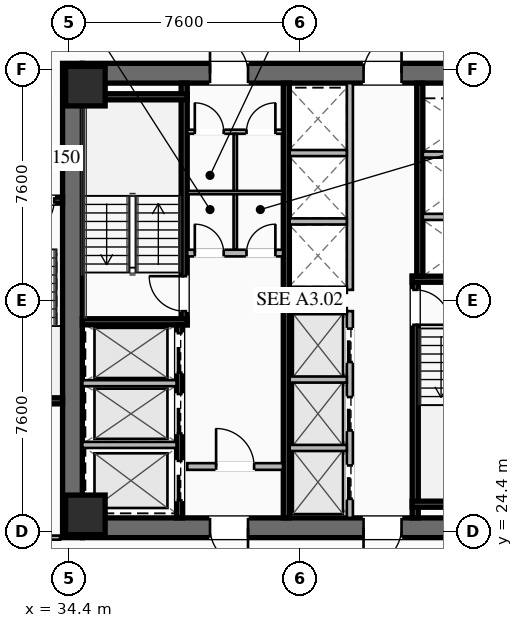
"""IFC4 building model, lengths in metres.
Left out: names, types, materials, properties, quantities, classifications, styles, units other than length and angle.
Written with IfcOpenShell. Run it as: python <this file> out.ifc"""

import sys

from ifc_helpers import new_model, si_unit, direction, frame, frame_2d, origin, origin_2d, place, context, subcontext, project, spatial, rectangle, hollow_rectangle, extrude, element, fill, save


model = new_model("IFC4")
c1 = context("Model", 3, precision=1e-05, world=origin(), true_north=direction((0.0, 1.0)))
c2 = subcontext(c1, "Body", "Model", "MODEL_VIEW")
j1 = project(units=[si_unit("LENGTHUNIT", "METRE"), si_unit("PLANEANGLEUNIT", "RADIAN")], contexts=[c1])
p1 = place(None, origin())
s1 = spatial("IfcSite", under=j1, at=p1, CompositionType="ELEMENT")
p2 = place(p1, origin())
s2 = spatial("IfcBuilding", under=s1, at=p2, CompositionType="ELEMENT")
p3 = place(p2, frame((0.0, 0.0, 102.7)))
s3 = spatial("IfcBuildingStorey", under=s2, at=p3, CompositionType="ELEMENT", Elevation=102.7)
p4 = place(p3, frame((34.525, 24.2, 0.0), z_axis=(0.0, 0.0, 1.0), x_axis=(0.0, 1.0, 0.0)))
e1 = element("IfcWall", 1, at=p4, inside=s3, PredefinedType="SHEAR", context=c2, shape_type="SweptSolid", body=[
    extrude(rectangle(XDim=15.6, YDim=0.65, at=frame_2d((7.8, 0.0))), origin(), (0.0, 0.0, 1.0), 3.55),
])
p5 = place(p3, frame((49.15, 24.525, 0.0), z_axis=(0.0, 0.0, 1.0), x_axis=(-1.0, 0.0, 0.0)))
e2 = element("IfcWall", 2, at=p5, inside=s3, PredefinedType="SHEAR", context=c2, shape_type="SweptSolid", body=[
    extrude(rectangle(XDim=14.3, YDim=0.65, at=frame_2d((7.15, 0.0))), origin(), (0.0, 0.0, 1.0), 3.55),
])
p6 = place(p5, frame((8.85, 0.0, 0.0)))
e3 = element("IfcOpeningElement", 3, at=p6, cuts=e2, PredefinedType="OPENING", context=c2, shape_type="SweptSolid", body=[
    extrude(rectangle(XDim=1.25, YDim=2.25, at=frame_2d((0.625, 1.125))), frame((0.0, 0.335, 0.0), z_axis=(0.0, -1.0, 0.0), x_axis=(1.0, 0.0, 0.0)), (0.0, 0.0, 1.0), 0.67),
])
p7 = place(p5, frame((3.8, 0.0, 0.0)))
e4 = element("IfcOpeningElement", 4, at=p7, cuts=e2, PredefinedType="OPENING", context=c2, shape_type="SweptSolid", body=[
    extrude(rectangle(XDim=1.25, YDim=2.25, at=frame_2d((0.625, 1.125))), frame((0.0, 0.335, 0.0), z_axis=(0.0, -1.0, 0.0), x_axis=(1.0, 0.0, 0.0)), (0.0, 0.0, 1.0), 0.67),
])
p8 = place(p3, frame((34.85, 39.475, 0.0), z_axis=(0.0, 0.0, 1.0), x_axis=(1.0, 0.0, 0.0)))
e5 = element("IfcWall", 5, at=p8, inside=s3, PredefinedType="SHEAR", context=c2, shape_type="SweptSolid", body=[
    extrude(rectangle(XDim=14.3, YDim=0.65, at=frame_2d((7.15, 0.0))), origin(), (0.0, 0.0, 1.0), 3.55),
])
p9 = place(p8, frame((4.2, 0.0, 0.0)))
e6 = element("IfcOpeningElement", 6, at=p9, cuts=e5, PredefinedType="OPENING", context=c2, shape_type="SweptSolid", body=[
    extrude(rectangle(XDim=1.25, YDim=2.25, at=frame_2d((0.625, 1.125))), frame((0.0, 0.335, 0.0), z_axis=(0.0, -1.0, 0.0), x_axis=(1.0, 0.0, 0.0)), (0.0, 0.0, 1.0), 0.67),
])
p10 = place(p8, frame((9.25, 0.0, 0.0)))
e7 = element("IfcOpeningElement", 7, at=p10, cuts=e5, PredefinedType="OPENING", context=c2, shape_type="SweptSolid", body=[
    extrude(rectangle(XDim=1.25, YDim=2.25, at=frame_2d((0.625, 1.125))), frame((0.0, 0.335, 0.0), z_axis=(0.0, -1.0, 0.0), x_axis=(1.0, 0.0, 0.0)), (0.0, 0.0, 1.0), 0.67),
])
for number, where, z_axis, x_axis in (
    (8, (34.95, 24.95, 0.0), (0.0, 0.0, 1.0), (1.0, 0.0, 0.0)),
    (9, (34.95, 39.05, 0.0), (0.0, 0.0, 1.0), (1.0, 0.0, 0.0)),
):
    element("IfcColumn", number, at=place(p3, frame(where, z_axis=z_axis, x_axis=x_axis)), inside=s3, PredefinedType="COLUMN", context=c2, shape_type="SweptSolid", body=[
        extrude(hollow_rectangle(XDim=1.3, YDim=1.3, WallThickness=0.05, at=origin_2d()), origin(), (0.0, 0.0, 1.0), 3.35),
    ])
p11 = place(p3, frame((38.2, 31.2, 0.0), z_axis=(0.0, 0.0, 1.0), x_axis=(0.0, 1.0, 0.0)))
e10 = element("IfcWall", 10, at=p11, inside=s3, PredefinedType="SHEAR", context=c2, shape_type="SweptSolid", body=[
    extrude(rectangle(XDim=7.95, YDim=0.2, at=frame_2d((3.975, 0.0))), origin(), (0.0, 0.0, 1.0), 3.35),
])
p12 = place(p11, frame((0.45, 0.0, 0.0)))
e11 = element("IfcOpeningElement", 11, at=p12, cuts=e10, PredefinedType="OPENING", context=c2, shape_type="SweptSolid", body=[
    extrude(rectangle(XDim=1.15, YDim=2.2, at=frame_2d((0.575, 1.1))), frame((0.0, 0.11, 0.0), z_axis=(0.0, -1.0, 0.0), x_axis=(1.0, 0.0, 0.0)), (0.0, 0.0, 1.0), 0.22),
])
for number, where, z_axis, x_axis in (
    (12, (34.85, 31.3, 0.0), (0.0, 0.0, 1.0), (1.0, 0.0, 0.0)),
    (13, (34.85, 38.7, 0.0), (0.0, 0.0, 1.0), (1.0, 0.0, 0.0)),
):
    element("IfcWall", number, at=place(p3, frame(where, z_axis=z_axis, x_axis=x_axis)), inside=s3, PredefinedType="SHEAR", context=c2, shape_type="SweptSolid", body=[
        extrude(rectangle(XDim=3.45, YDim=0.2, at=frame_2d((1.725, 0.0))), origin(), (0.0, 0.0, 1.0), 3.35),
    ])
p13 = place(p3, frame((45.8, 32.8, 0.0), z_axis=(0.0, 0.0, 1.0), x_axis=(0.0, -1.0, 0.0)))
e14 = element("IfcWall", 14, at=p13, inside=s3, PredefinedType="SHEAR", context=c2, shape_type="SweptSolid", body=[
    extrude(rectangle(XDim=7.95, YDim=0.2, at=frame_2d((3.975, 0.0))), origin(), (0.0, 0.0, 1.0), 3.35),
])
p14 = place(p13, frame((0.45, 0.0, 0.0)))
e15 = element("IfcOpeningElement", 15, at=p14, cuts=e14, PredefinedType="OPENING", context=c2, shape_type="SweptSolid", body=[
    extrude(rectangle(XDim=1.15, YDim=2.2, at=frame_2d((0.575, 1.1))), frame((0.0, 0.11, 0.0), z_axis=(0.0, -1.0, 0.0), x_axis=(1.0, 0.0, 0.0)), (0.0, 0.0, 1.0), 0.22),
])
for number, where, z_axis, x_axis in (
    (16, (45.7, 32.7, 0.0), (0.0, 0.0, 1.0), (1.0, 0.0, 0.0)),
    (17, (45.7, 25.3, 0.0), (0.0, 0.0, 1.0), (1.0, 0.0, 0.0)),
):
    element("IfcWall", number, at=place(p3, frame(where, z_axis=z_axis, x_axis=x_axis)), inside=s3, PredefinedType="SHEAR", context=c2, shape_type="SweptSolid", body=[
        extrude(rectangle(XDim=3.45, YDim=0.2, at=frame_2d((1.725, 0.0))), origin(), (0.0, 0.0, 1.0), 3.35),
    ])
p15 = place(p3, frame((41.56, 24.85, 0.0), z_axis=(0.0, 0.0, 1.0), x_axis=(0.0, 1.0, 0.0)))
e18 = element("IfcWall", 18, at=p15, inside=s3, PredefinedType="SHEAR", context=c2, shape_type="SweptSolid", body=[
    extrude(rectangle(XDim=14.3, YDim=0.2, at=frame_2d((7.15, 0.0))), origin(), (0.0, 0.0, 1.0), 3.35),
])
p16 = place(p3, frame((38.3, 33.56, 0.0), z_axis=(0.0, 0.0, 1.0), x_axis=(1.0, 0.0, 0.0)))
e19 = element("IfcWall", 19, at=p16, inside=s3, PredefinedType="SOLIDWALL", context=c2, shape_type="SweptSolid", body=[
    extrude(rectangle(XDim=3.15, YDim=0.22, at=frame_2d((1.575, 0.0))), origin(), (0.0, 0.0, 1.0), 2.703),
])
p17 = place(p16, frame((0.25, 0.0, 0.0)))
e20 = element("IfcOpeningElement", 20, at=p17, cuts=e19, PredefinedType="OPENING", context=c2, shape_type="SweptSolid", body=[
    extrude(rectangle(XDim=0.95, YDim=2.05, at=frame_2d((0.475, 1.025))), frame((0.0, 0.12, 0.0), z_axis=(0.0, -1.0, 0.0), x_axis=(1.0, 0.0, 0.0)), (0.0, 0.0, 1.0), 0.24),
])
p18 = place(p16, frame((1.95, 0.0, 0.0)))
e21 = element("IfcOpeningElement", 21, at=p18, cuts=e19, PredefinedType="OPENING", context=c2, shape_type="SweptSolid", body=[
    extrude(rectangle(XDim=0.95, YDim=2.05, at=frame_2d((0.475, 1.025))), frame((0.0, 0.12, 0.0), z_axis=(0.0, -1.0, 0.0), x_axis=(1.0, 0.0, 0.0)), (0.0, 0.0, 1.0), 0.24),
])
p19 = place(p3, frame((38.3, 26.54, 0.0), z_axis=(0.0, 0.0, 1.0), x_axis=(1.0, 0.0, 0.0)))
e22 = element("IfcWall", 22, at=p19, inside=s3, PredefinedType="SOLIDWALL", context=c2, shape_type="SweptSolid", body=[
    extrude(rectangle(XDim=3.15, YDim=0.22, at=frame_2d((1.575, 0.0))), origin(), (0.0, 0.0, 1.0), 2.703),
])
p20 = place(p19, frame((0.95, 0.0, 0.0)))
e23 = element("IfcOpeningElement", 23, at=p20, cuts=e22, PredefinedType="OPENING", context=c2, shape_type="SweptSolid", body=[
    extrude(rectangle(XDim=1.25, YDim=2.25, at=frame_2d((0.625, 1.125))), frame((0.0, 0.12, 0.0), z_axis=(0.0, -1.0, 0.0), x_axis=(1.0, 0.0, 0.0)), (0.0, 0.0, 1.0), 0.24),
])
p21 = place(p3, frame((38.05, 24.85, 0.0), z_axis=(0.0, 0.0, 1.0), x_axis=(0.0, 1.0, 0.0)))
e24 = element("IfcWall", 24, at=p21, inside=s3, PredefinedType="SHEAR", context=c2, shape_type="SweptSolid", body=[
    extrude(rectangle(XDim=6.35, YDim=0.2, at=frame_2d((3.175, 0.0))), origin(), (0.0, 0.0, 1.0), 3.35),
])
p22 = place(p21, frame((4.775, 0.0, 0.0)))
e25 = element("IfcOpeningElement", 25, at=p22, cuts=e24, PredefinedType="OPENING", context=c2, shape_type="SweptSolid", body=[
    extrude(rectangle(XDim=1.3, YDim=2.25, at=frame_2d((0.65, 1.125))), frame((0.0, 0.11, 0.0), z_axis=(0.0, -1.0, 0.0), x_axis=(1.0, 0.0, 0.0)), (0.0, 0.0, 1.0), 0.22),
])
p23 = place(p21, frame((2.775, 0.0, 0.0)))
e26 = element("IfcOpeningElement", 26, at=p23, cuts=e24, PredefinedType="OPENING", context=c2, shape_type="SweptSolid", body=[
    extrude(rectangle(XDim=1.3, YDim=2.25, at=frame_2d((0.65, 1.125))), frame((0.0, 0.11, 0.0), z_axis=(0.0, -1.0, 0.0), x_axis=(1.0, 0.0, 0.0)), (0.0, 0.0, 1.0), 0.22),
])
p24 = place(p21, frame((0.575, 0.0, 0.0)))
e27 = element("IfcOpeningElement", 27, at=p24, cuts=e24, PredefinedType="OPENING", context=c2, shape_type="SweptSolid", body=[
    extrude(rectangle(XDim=1.3, YDim=2.25, at=frame_2d((0.65, 1.125))), frame((0.0, 0.11, 0.0), z_axis=(0.0, -1.0, 0.0), x_axis=(1.0, 0.0, 0.0)), (0.0, 0.0, 1.0), 0.22),
])
for number, where, z_axis, x_axis in (
    (28, (34.85, 27.25, 0.0), (0.0, 0.0, 1.0), (1.0, 0.0, 0.0)),
    (29, (34.85, 29.28, 0.0), (0.0, 0.0, 1.0), (1.0, 0.0, 0.0)),
):
    element("IfcWall", number, at=place(p3, frame(where, z_axis=z_axis, x_axis=x_axis)), inside=s3, PredefinedType="SOLIDWALL", context=c2, shape_type="SweptSolid", body=[
        extrude(rectangle(XDim=3.1, YDim=0.2, at=frame_2d((1.55, 0.0))), origin(), (0.0, 0.0, 1.0), 3.35),
    ])
p25 = place(p3, frame((45.95, 39.15, 0.0), z_axis=(0.0, 0.0, 1.0), x_axis=(0.0, -1.0, 0.0)))
e30 = element("IfcWall", 30, at=p25, inside=s3, PredefinedType="SHEAR", context=c2, shape_type="SweptSolid", body=[
    extrude(rectangle(XDim=6.35, YDim=0.2, at=frame_2d((3.175, 0.0))), origin(), (0.0, 0.0, 1.0), 3.35),
])
for number, where, z_axis, x_axis in (
    (31, (46.05, 34.75, 0.0), (0.0, 0.0, 1.0), (1.0, 0.0, 0.0)),
    (32, (46.05, 36.8, 0.0), (0.0, 0.0, 1.0), (1.0, 0.0, 0.0)),
):
    element("IfcWall", number, at=place(p3, frame(where, z_axis=z_axis, x_axis=x_axis)), inside=s3, PredefinedType="SOLIDWALL", context=c2, shape_type="SweptSolid", body=[
        extrude(rectangle(XDim=3.1, YDim=0.2, at=frame_2d((1.55, 0.0))), origin(), (0.0, 0.0, 1.0), 3.35),
    ])
p26 = place(p3, frame((38.3, 37.55, 0.0), z_axis=(0.0, 0.0, 1.0), x_axis=(1.0, 0.0, 0.0)))
e33 = element("IfcWall", 33, at=p26, inside=s3, PredefinedType="PARTITIONING", context=c2, shape_type="SweptSolid", body=[
    extrude(rectangle(XDim=3.15, YDim=0.135, at=frame_2d((1.575, 0.0))), origin(), (0.0, 0.0, 1.0), 2.703),
])
p27 = place(p26, frame((0.25, 0.0, 0.0)))
e34 = element("IfcOpeningElement", 34, at=p27, cuts=e33, PredefinedType="OPENING", context=c2, shape_type="SweptSolid", body=[
    extrude(rectangle(XDim=0.95, YDim=2.05, at=frame_2d((0.475, 1.025))), frame((0.0, 0.077, 0.0), z_axis=(0.0, -1.0, 0.0), x_axis=(1.0, 0.0, 0.0)), (0.0, 0.0, 1.0), 0.155),
])
p28 = place(p26, frame((1.95, 0.0, 0.0)))
e35 = element("IfcOpeningElement", 35, at=p28, cuts=e33, PredefinedType="OPENING", context=c2, shape_type="SweptSolid", body=[
    extrude(rectangle(XDim=0.95, YDim=2.05, at=frame_2d((0.475, 1.025))), frame((0.0, 0.077, 0.0), z_axis=(0.0, -1.0, 0.0), x_axis=(1.0, 0.0, 0.0)), (0.0, 0.0, 1.0), 0.155),
])
p29 = place(p3, frame((39.88, 33.68, 0.0), z_axis=(0.0, 0.0, 1.0), x_axis=(0.0, 1.0, 0.0)))
e36 = element("IfcWall", 36, at=p29, inside=s3, PredefinedType="PARTITIONING", context=c2, shape_type="SweptSolid", body=[
    extrude(rectangle(XDim=3.8, YDim=0.11, at=frame_2d((1.9, 0.0))), origin(), (0.0, 0.0, 1.0), 2.703),
])
p30 = place(p3, frame((38.3, 35.55, 0.0), z_axis=(0.0, 0.0, 1.0), x_axis=(1.0, 0.0, 0.0)))
e37 = element("IfcWall", 37, at=p30, inside=s3, PredefinedType="PARTITIONING", context=c2, shape_type="SweptSolid", body=[
    extrude(rectangle(XDim=3.15, YDim=0.11, at=frame_2d((1.575, 0.0))), origin(), (0.0, 0.0, 1.0), 2.703),
])
p31 = place(p3, frame((43.65, 24.85, 0.0), z_axis=(0.0, 0.0, 1.0), x_axis=(0.0, 1.0, 0.0)))
e38 = element("IfcWall", 38, at=p31, inside=s3, PredefinedType="SOLIDWALL", context=c2, shape_type="SweptSolid", body=[
    extrude(rectangle(XDim=6.8, YDim=0.2, at=frame_2d((3.4, 0.0))), origin(), (0.0, 0.0, 1.0), 3.35),
])
p32 = place(p31, frame((0.625, 0.0, 0.0)))
e39 = element("IfcOpeningElement", 39, at=p32, cuts=e38, PredefinedType="OPENING", context=c2, shape_type="SweptSolid", body=[
    extrude(rectangle(XDim=1.1, YDim=2.2, at=frame_2d((0.55, 1.1))), frame((0.0, 0.11, 0.0), z_axis=(0.0, -1.0, 0.0), x_axis=(1.0, 0.0, 0.0)), (0.0, 0.0, 1.0), 0.22),
])
p33 = place(p31, frame((2.875, 0.0, 0.0)))
e40 = element("IfcOpeningElement", 40, at=p33, cuts=e38, PredefinedType="OPENING", context=c2, shape_type="SweptSolid", body=[
    extrude(rectangle(XDim=1.1, YDim=2.2, at=frame_2d((0.55, 1.1))), frame((0.0, 0.11, 0.0), z_axis=(0.0, -1.0, 0.0), x_axis=(1.0, 0.0, 0.0)), (0.0, 0.0, 1.0), 0.22),
])
p34 = place(p31, frame((5.125, 0.0, 0.0)))
e41 = element("IfcOpeningElement", 41, at=p34, cuts=e38, PredefinedType="OPENING", context=c2, shape_type="SweptSolid", body=[
    extrude(rectangle(XDim=1.1, YDim=2.2, at=frame_2d((0.55, 1.1))), frame((0.0, 0.11, 0.0), z_axis=(0.0, -1.0, 0.0), x_axis=(1.0, 0.0, 0.0)), (0.0, 0.0, 1.0), 0.22),
])
for number, where, z_axis, x_axis in (
    (42, (41.67, 27.15, 0.0), (0.0, 0.0, 1.0), (1.0, 0.0, 0.0)),
    (43, (41.67, 29.4, 0.0), (0.0, 0.0, 1.0), (1.0, 0.0, 0.0)),
    (44, (41.67, 31.65, 0.0), (0.0, 0.0, 1.0), (1.0, 0.0, 0.0)),
):
    element("IfcWall", number, at=place(p3, frame(where, z_axis=z_axis, x_axis=x_axis)), inside=s3, PredefinedType="SOLIDWALL", context=c2, shape_type="SweptSolid", body=[
        extrude(rectangle(XDim=1.88, YDim=0.2, at=frame_2d((0.94, 0.0))), origin(), (0.0, 0.0, 1.0), 3.35),
    ])
p35 = place(p3, frame((43.65, 32.35, 0.0), z_axis=(0.0, 0.0, 1.0), x_axis=(0.0, 1.0, 0.0)))
e45 = element("IfcWall", 45, at=p35, inside=s3, PredefinedType="SOLIDWALL", context=c2, shape_type="SweptSolid", body=[
    extrude(rectangle(XDim=6.8, YDim=0.2, at=frame_2d((3.4, 0.0))), origin(), (0.0, 0.0, 1.0), 3.35),
])
for number, where, z_axis, x_axis in (
    (46, (41.67, 32.35, 0.0), (0.0, 0.0, 1.0), (1.0, 0.0, 0.0)),
    (47, (41.67, 34.6, 0.0), (0.0, 0.0, 1.0), (1.0, 0.0, 0.0)),
    (48, (41.67, 36.85, 0.0), (0.0, 0.0, 1.0), (1.0, 0.0, 0.0)),
):
    element("IfcWall", number, at=place(p3, frame(where, z_axis=z_axis, x_axis=x_axis)), inside=s3, PredefinedType="SOLIDWALL", context=c2, shape_type="SweptSolid", body=[
        extrude(rectangle(XDim=1.88, YDim=0.2, at=frame_2d((0.94, 0.0))), origin(), (0.0, 0.0, 1.0), 3.35),
    ])
p36 = place(p3, frame((34.2, 35.3, 0.0), z_axis=(0.0, 0.0, 1.0), x_axis=(-1.0, 0.0, 0.0)))
e49 = element("IfcWall", 49, at=p36, inside=s3, PredefinedType="SHEAR", context=c2, shape_type="SweptSolid", body=[
    extrude(rectangle(XDim=3.4, YDim=0.2, at=frame_2d((1.7, 0.0))), origin(), (0.0, 0.0, 1.0), 3.35),
])
p37 = place(p36, frame((0.275, 0.0, 0.0)))
e50 = element("IfcOpeningElement", 50, at=p37, cuts=e49, PredefinedType="OPENING", context=c2, shape_type="SweptSolid", body=[
    extrude(rectangle(XDim=1.15, YDim=2.2, at=frame_2d((0.575, 1.1))), frame((0.0, 0.11, 0.0), z_axis=(0.0, -1.0, 0.0), x_axis=(1.0, 0.0, 0.0)), (0.0, 0.0, 1.0), 0.22),
])
p38 = place(p3, frame((30.8, 28.7, 0.0), z_axis=(0.0, 0.0, 1.0), x_axis=(1.0, 0.0, 0.0)))
e51 = element("IfcWall", 51, at=p38, inside=s3, PredefinedType="SHEAR", context=c2, shape_type="SweptSolid", body=[
    extrude(rectangle(XDim=3.4, YDim=0.2, at=frame_2d((1.7, 0.0))), origin(), (0.0, 0.0, 1.0), 3.35),
])
p39 = place(p3, frame((21.02, 24.2, 0.0), z_axis=(0.0, 0.0, 1.0), x_axis=(1.0, 0.0, 0.0)))
e52 = element("IfcWall", 52, at=p39, inside=s3, PredefinedType="PARTITIONING", context=c2, shape_type="SweptSolid", body=[
    extrude(rectangle(XDim=13.1, YDim=0.135, at=frame_2d((6.55, 0.0))), origin(), (0.0, 0.0, 1.0), 2.703),
])
p40 = place(p39, frame((10.105, 0.0, 0.0)))
e53 = element("IfcOpeningElement", 53, at=p40, cuts=e52, PredefinedType="OPENING", context=c2, shape_type="SweptSolid", body=[
    extrude(rectangle(XDim=0.95, YDim=2.05, at=frame_2d((0.475, 1.025))), frame((0.0, 0.077, 0.0), z_axis=(0.0, -1.0, 0.0), x_axis=(1.0, 0.0, 0.0)), (0.0, 0.0, 1.0), 0.155),
])
p41 = place(p9, origin())
e54 = element("IfcDoor", 54, at=p41, inside=s3, OperationType="SINGLE_SWING_LEFT", PredefinedType="DOOR", context=c2, shape_type="SweptSolid", body=[
    extrude(rectangle(XDim=1.25, YDim=2.25, at=frame_2d((0.625, 1.125))), frame((0.0, 0.025, 0.0), z_axis=(0.0, -1.0, 0.0), x_axis=(1.0, 0.0, 0.0)), (0.0, 0.0, 1.0), 0.05),
])
fill(e6, e54)
p42 = place(p10, origin())
e55 = element("IfcDoor", 55, at=p42, inside=s3, OperationType="SINGLE_SWING_RIGHT", PredefinedType="DOOR", context=c2, shape_type="SweptSolid", body=[
    extrude(rectangle(XDim=1.25, YDim=2.25, at=frame_2d((0.625, 1.125))), frame((0.0, 0.025, 0.0), z_axis=(0.0, -1.0, 0.0), x_axis=(1.0, 0.0, 0.0)), (0.0, 0.0, 1.0), 0.05),
])
fill(e7, e55)
p43 = place(p6, origin())
e56 = element("IfcDoor", 56, at=p43, inside=s3, OperationType="SINGLE_SWING_LEFT", PredefinedType="DOOR", context=c2, shape_type="SweptSolid", body=[
    extrude(rectangle(XDim=1.25, YDim=2.25, at=frame_2d((0.625, 1.125))), frame((0.0, 0.025, 0.0), z_axis=(0.0, -1.0, 0.0), x_axis=(1.0, 0.0, 0.0)), (0.0, 0.0, 1.0), 0.05),
])
fill(e3, e56)
p44 = place(p7, origin())
e57 = element("IfcDoor", 57, at=p44, inside=s3, OperationType="SINGLE_SWING_RIGHT", PredefinedType="DOOR", context=c2, shape_type="SweptSolid", body=[
    extrude(rectangle(XDim=1.25, YDim=2.25, at=frame_2d((0.625, 1.125))), frame((0.0, 0.025, 0.0), z_axis=(0.0, -1.0, 0.0), x_axis=(1.0, 0.0, 0.0)), (0.0, 0.0, 1.0), 0.05),
])
fill(e4, e57)
p45 = place(p12, origin())
e58 = element("IfcDoor", 58, at=p45, inside=s3, OperationType="SINGLE_SWING_RIGHT", PredefinedType="DOOR", context=c2, shape_type="SweptSolid", body=[
    extrude(rectangle(XDim=1.15, YDim=2.2, at=frame_2d((0.575, 1.1))), frame((0.0, 0.025, 0.0), z_axis=(0.0, -1.0, 0.0), x_axis=(1.0, 0.0, 0.0)), (0.0, 0.0, 1.0), 0.05),
])
fill(e11, e58)
p46 = place(p14, origin())
e59 = element("IfcDoor", 59, at=p46, inside=s3, OperationType="SINGLE_SWING_RIGHT", PredefinedType="DOOR", context=c2, shape_type="SweptSolid", body=[
    extrude(rectangle(XDim=1.15, YDim=2.2, at=frame_2d((0.575, 1.1))), frame((0.0, 0.025, 0.0), z_axis=(0.0, -1.0, 0.0), x_axis=(1.0, 0.0, 0.0)), (0.0, 0.0, 1.0), 0.05),
])
fill(e15, e59)
p47 = place(p20, origin())
e60 = element("IfcDoor", 60, at=p47, inside=s3, OperationType="SINGLE_SWING_LEFT", PredefinedType="DOOR", context=c2, shape_type="SweptSolid", body=[
    extrude(rectangle(XDim=1.25, YDim=2.25, at=frame_2d((0.625, 1.125))), frame((0.0, 0.025, 0.0), z_axis=(0.0, -1.0, 0.0), x_axis=(1.0, 0.0, 0.0)), (0.0, 0.0, 1.0), 0.05),
])
fill(e23, e60)
p48 = place(p27, origin())
e61 = element("IfcDoor", 61, at=p48, inside=s3, OperationType="SINGLE_SWING_LEFT", PredefinedType="DOOR", context=c2, shape_type="SweptSolid", body=[
    extrude(rectangle(XDim=0.95, YDim=2.05, at=frame_2d((0.475, 1.025))), frame((0.0, 0.025, 0.0), z_axis=(0.0, -1.0, 0.0), x_axis=(1.0, 0.0, 0.0)), (0.0, 0.0, 1.0), 0.05),
])
fill(e34, e61)
p49 = place(p28, origin())
e62 = element("IfcDoor", 62, at=p49, inside=s3, OperationType="SINGLE_SWING_RIGHT", PredefinedType="DOOR", context=c2, shape_type="SweptSolid", body=[
    extrude(rectangle(XDim=0.95, YDim=2.05, at=frame_2d((0.475, 1.025))), frame((0.0, 0.025, 0.0), z_axis=(0.0, -1.0, 0.0), x_axis=(1.0, 0.0, 0.0)), (0.0, 0.0, 1.0), 0.05),
])
fill(e35, e62)
p50 = place(p17, origin())
e63 = element("IfcDoor", 63, at=p50, inside=s3, OperationType="SINGLE_SWING_LEFT", PredefinedType="DOOR", context=c2, shape_type="SweptSolid", body=[
    extrude(rectangle(XDim=0.95, YDim=2.05, at=frame_2d((0.475, 1.025))), frame((0.0, 0.025, 0.0), z_axis=(0.0, -1.0, 0.0), x_axis=(1.0, 0.0, 0.0)), (0.0, 0.0, 1.0), 0.05),
])
fill(e20, e63)
p51 = place(p18, origin())
e64 = element("IfcDoor", 64, at=p51, inside=s3, OperationType="SINGLE_SWING_RIGHT", PredefinedType="DOOR", context=c2, shape_type="SweptSolid", body=[
    extrude(rectangle(XDim=0.95, YDim=2.05, at=frame_2d((0.475, 1.025))), frame((0.0, 0.025, 0.0), z_axis=(0.0, -1.0, 0.0), x_axis=(1.0, 0.0, 0.0)), (0.0, 0.0, 1.0), 0.05),
])
fill(e21, e64)
p52 = place(p37, origin())
e65 = element("IfcDoor", 65, at=p52, inside=s3, OperationType="SINGLE_SWING_RIGHT", PredefinedType="DOOR", context=c2, shape_type="SweptSolid", body=[
    extrude(rectangle(XDim=1.15, YDim=2.2, at=frame_2d((0.575, 1.1))), frame((0.0, 0.025, 0.0), z_axis=(0.0, -1.0, 0.0), x_axis=(1.0, 0.0, 0.0)), (0.0, 0.0, 1.0), 0.05),
])
fill(e50, e65)
p53 = place(p22, origin())
e66 = element("IfcDoor", 66, at=p53, inside=s3, OperationType="SLIDING_TO_LEFT", PredefinedType="DOOR", context=c2, shape_type="SweptSolid", body=[
    extrude(rectangle(XDim=1.3, YDim=2.25, at=frame_2d((0.65, 1.125))), frame((0.0, 0.025, 0.0), z_axis=(0.0, -1.0, 0.0), x_axis=(1.0, 0.0, 0.0)), (0.0, 0.0, 1.0), 0.05),
])
fill(e25, e66)
p54 = place(p23, origin())
e67 = element("IfcDoor", 67, at=p54, inside=s3, OperationType="SLIDING_TO_LEFT", PredefinedType="DOOR", context=c2, shape_type="SweptSolid", body=[
    extrude(rectangle(XDim=1.3, YDim=2.25, at=frame_2d((0.65, 1.125))), frame((0.0, 0.025, 0.0), z_axis=(0.0, -1.0, 0.0), x_axis=(1.0, 0.0, 0.0)), (0.0, 0.0, 1.0), 0.05),
])
fill(e26, e67)
p55 = place(p24, origin())
e68 = element("IfcDoor", 68, at=p55, inside=s3, OperationType="SLIDING_TO_LEFT", PredefinedType="DOOR", context=c2, shape_type="SweptSolid", body=[
    extrude(rectangle(XDim=1.3, YDim=2.25, at=frame_2d((0.65, 1.125))), frame((0.0, 0.025, 0.0), z_axis=(0.0, -1.0, 0.0), x_axis=(1.0, 0.0, 0.0)), (0.0, 0.0, 1.0), 0.05),
])
fill(e27, e68)
p56 = place(p32, origin())
e69 = element("IfcDoor", 69, at=p56, inside=s3, OperationType="SLIDING_TO_LEFT", PredefinedType="DOOR", context=c2, shape_type="SweptSolid", body=[
    extrude(rectangle(XDim=1.1, YDim=2.2, at=frame_2d((0.55, 1.1))), frame((0.0, 0.025, 0.0), z_axis=(0.0, -1.0, 0.0), x_axis=(1.0, 0.0, 0.0)), (0.0, 0.0, 1.0), 0.05),
])
fill(e39, e69)
p57 = place(p33, origin())
e70 = element("IfcDoor", 70, at=p57, inside=s3, OperationType="SLIDING_TO_LEFT", PredefinedType="DOOR", context=c2, shape_type="SweptSolid", body=[
    extrude(rectangle(XDim=1.1, YDim=2.2, at=frame_2d((0.55, 1.1))), frame((0.0, 0.025, 0.0), z_axis=(0.0, -1.0, 0.0), x_axis=(1.0, 0.0, 0.0)), (0.0, 0.0, 1.0), 0.05),
])
fill(e40, e70)
p58 = place(p34, origin())
e71 = element("IfcDoor", 71, at=p58, inside=s3, OperationType="SLIDING_TO_LEFT", PredefinedType="DOOR", context=c2, shape_type="SweptSolid", body=[
    extrude(rectangle(XDim=1.1, YDim=2.2, at=frame_2d((0.55, 1.1))), frame((0.0, 0.025, 0.0), z_axis=(0.0, -1.0, 0.0), x_axis=(1.0, 0.0, 0.0)), (0.0, 0.0, 1.0), 0.05),
])
fill(e41, e71)
save(model, sys.argv[1])
